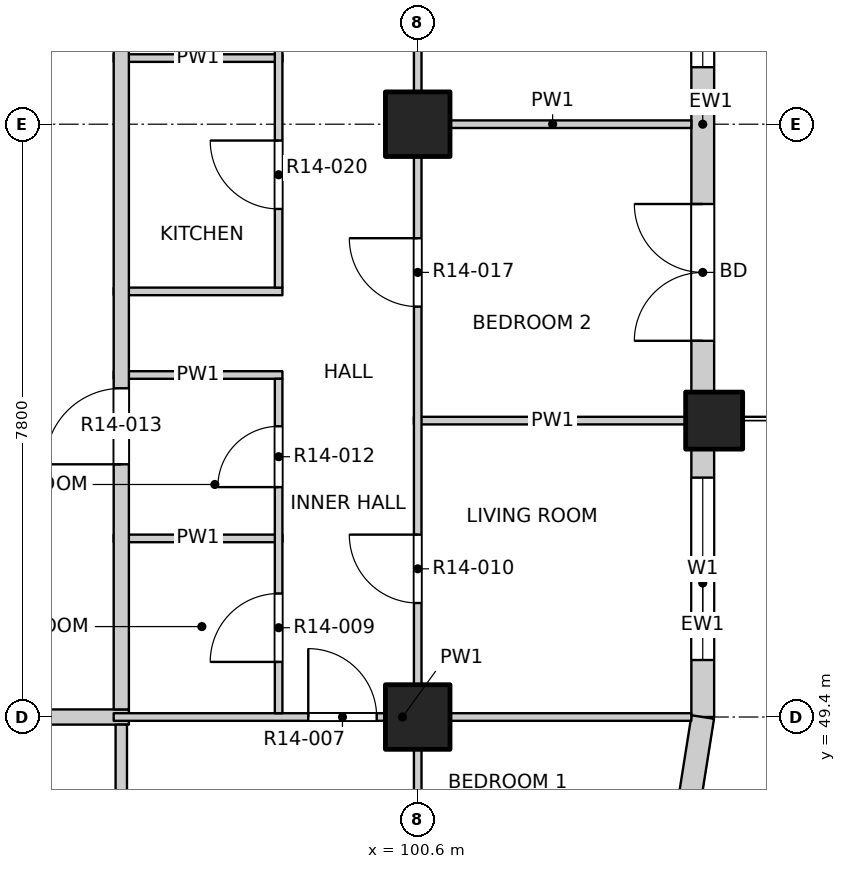
"""IFC4 building model, lengths in metres.
Left out: names, types, materials, properties, quantities, classifications, styles, units other than length and angle.
Written with IfcOpenShell. Run it as: python <this file> out.ifc"""

import sys

from ifc_helpers import new_model, si_unit, direction, frame, frame_2d, origin, origin_2d, place, context, subcontext, project, spatial, rectangle, extrude, element, fill, save


model = new_model("IFC4")
c1 = context("Model", 3, precision=1e-05, world=origin(), true_north=direction((0.0, 1.0)))
c2 = subcontext(c1, "Body", "Model", "MODEL_VIEW")
j1 = project(units=[si_unit("LENGTHUNIT", "METRE"), si_unit("PLANEANGLEUNIT", "RADIAN")], contexts=[c1])
p1 = place(None, origin())
s1 = spatial("IfcSite", under=j1, at=p1, CompositionType="ELEMENT")
p2 = place(p1, origin())
s2 = spatial("IfcBuilding", under=s1, at=p2, CompositionType="ELEMENT")
p3 = place(p2, frame((0.0, 0.0, 148.6)))
s3 = spatial("IfcBuildingStorey", under=s2, at=p3, CompositionType="ELEMENT", Elevation=148.6)
p4 = place(p3, frame((104.5, 53.3, -0.3), z_axis=(0.0, 0.0, 1.0), x_axis=(1.0, 0.0, 0.0)))
e1 = element("IfcColumn", 1, at=p4, inside=s3, PredefinedType="COLUMN", context=c2, shape_type="SweptSolid", body=[
    extrude(rectangle(XDim=0.75, YDim=0.75, at=origin_2d()), origin(), (0.0, 0.0, 1.0), 3.45),
])
for number, where, z_axis, x_axis in (
    (2, (100.6, 49.4, -0.3), (0.0, 0.0, 1.0), (1.0, 0.0, 0.0)),
    (3, (100.6, 57.2, -0.3), (0.0, 0.0, 1.0), (1.0, 0.0, 0.0)),
):
    element("IfcColumn", number, at=place(p3, frame(where, z_axis=z_axis, x_axis=x_axis)), inside=s3, PredefinedType="COLUMN", context=c2, shape_type="SweptSolid", body=[
        extrude(rectangle(XDim=0.85, YDim=0.85, at=origin_2d()), origin(), (0.0, 0.0, 1.0), 3.45),
    ])
p5 = place(p3, frame((104.35, 49.4, 0.0), z_axis=(0.0, 0.0, 1.0), x_axis=(0.0, 1.0, 0.0)))
e4 = element("IfcWall", 4, at=p5, inside=s3, PredefinedType="SOLIDWALL", context=c2, shape_type="SweptSolid", body=[
    extrude(rectangle(XDim=3.525, YDim=0.3, at=frame_2d((1.763, 0.0))), origin(), (0.0, 0.0, 1.0), 2.7),
])
p6 = place(p5, frame((0.75, 0.0, 0.9)))
e5 = element("IfcOpeningElement", 5, at=p6, cuts=e4, PredefinedType="OPENING", context=c2, shape_type="SweptSolid", body=[
    extrude(rectangle(XDim=2.4, YDim=1.8, at=frame_2d((1.2, 0.9))), frame((0.0, 0.16, 0.0), z_axis=(0.0, -1.0, 0.0), x_axis=(1.0, 0.0, 0.0)), (0.0, 0.0, 1.0), 0.32),
])
p7 = place(p3, frame((104.35, 53.675, 0.0), z_axis=(0.0, 0.0, 1.0), x_axis=(0.0, 1.0, 0.0)))
e6 = element("IfcWall", 6, at=p7, inside=s3, PredefinedType="SOLIDWALL", context=c2, shape_type="SweptSolid", body=[
    extrude(rectangle(XDim=7.05, YDim=0.3, at=frame_2d((3.525, 0.0))), origin(), (0.0, 0.0, 1.0), 2.7),
])
p8 = place(p7, frame((0.675, 0.0, 0.0)))
e7 = element("IfcOpeningElement", 7, at=p8, cuts=e6, PredefinedType="OPENING", context=c2, shape_type="SweptSolid", body=[
    extrude(rectangle(XDim=1.8, YDim=2.4, at=frame_2d((0.9, 1.2))), frame((0.0, 0.16, 0.0), z_axis=(0.0, -1.0, 0.0), x_axis=(1.0, 0.0, 0.0)), (0.0, 0.0, 1.0), 0.32),
])
p9 = place(p7, frame((4.275, 0.0, 0.9)))
e8 = element("IfcOpeningElement", 8, at=p9, cuts=e6, PredefinedType="OPENING", context=c2, shape_type="SweptSolid", body=[
    extrude(rectangle(XDim=2.4, YDim=1.8, at=frame_2d((1.2, 0.9))), frame((0.0, 0.16, 0.0), z_axis=(0.0, -1.0, 0.0), x_axis=(1.0, 0.0, 0.0)), (0.0, 0.0, 1.0), 0.32),
])
p10 = place(p3, frame((104.167, 48.241, 0.0), z_axis=(0.0, 0.0, 1.0), x_axis=(0.156496880861, 0.987678452879, 0.0)))
e9 = element("IfcWall", 9, at=p10, inside=s3, PredefinedType="SOLIDWALL", context=c2, shape_type="SweptSolid", body=[
    extrude(rectangle(XDim=1.173, YDim=0.3, at=frame_2d((0.586, 0.0))), origin(), (0.0, 0.0, 1.0), 2.7),
])
p11 = place(p3, frame((73.2, 49.4, 0.0), z_axis=(0.0, 0.0, 1.0), x_axis=(1.0, 0.0, 0.0)))
e10 = element("IfcWall", 10, at=p11, inside=s3, PredefinedType="PARTITIONING", context=c2, shape_type="SweptSolid", body=[
    extrude(rectangle(XDim=23.6, YDim=0.2, at=frame_2d((11.8, 0.0))), origin(), (0.0, 0.0, 1.0), 3.15),
])
p12 = place(p11, frame((4.525, 0.0, 0.0)))
e11 = element("IfcOpeningElement", 11, at=p12, cuts=e10, PredefinedType="OPENING", context=c2, shape_type="SweptSolid", body=[
    extrude(rectangle(XDim=1.2, YDim=2.1, at=frame_2d((0.6, 1.05))), frame((0.0, 0.11, 0.0), z_axis=(0.0, -1.0, 0.0), x_axis=(1.0, 0.0, 0.0)), (0.0, 0.0, 1.0), 0.22),
])
p13 = place(p11, frame((12.325, 0.0, 0.0)))
e12 = element("IfcOpeningElement", 12, at=p13, cuts=e10, PredefinedType="OPENING", context=c2, shape_type="SweptSolid", body=[
    extrude(rectangle(XDim=1.2, YDim=2.1, at=frame_2d((0.6, 1.05))), frame((0.0, 0.11, 0.0), z_axis=(0.0, -1.0, 0.0), x_axis=(1.0, 0.0, 0.0)), (0.0, 0.0, 1.0), 0.22),
])
p14 = place(p11, frame((20.125, 0.0, 0.0)))
e13 = element("IfcOpeningElement", 13, at=p14, cuts=e10, PredefinedType="OPENING", context=c2, shape_type="SweptSolid", body=[
    extrude(rectangle(XDim=1.2, YDim=2.1, at=frame_2d((0.6, 1.05))), frame((0.0, 0.11, 0.0), z_axis=(0.0, -1.0, 0.0), x_axis=(1.0, 0.0, 0.0)), (0.0, 0.0, 1.0), 0.22),
])
p15 = place(p3, frame((96.6, 49.4, 0.0), z_axis=(0.0, 0.0, 1.0), x_axis=(1.0, 0.0, 0.0)))
e14 = element("IfcWall", 14, at=p15, inside=s3, PredefinedType="PARTITIONING", context=c2, shape_type="SweptSolid", body=[
    extrude(rectangle(XDim=7.6, YDim=0.1, at=frame_2d((3.8, 0.0))), origin(), (0.0, 0.0, 1.0), 3.15),
])
p16 = place(p15, frame((2.56, 0.0, 0.0)))
e15 = element("IfcOpeningElement", 15, at=p16, cuts=e14, PredefinedType="OPENING", context=c2, shape_type="SweptSolid", body=[
    extrude(rectangle(XDim=0.9, YDim=2.1, at=frame_2d((0.45, 1.05))), frame((0.0, 0.06, 0.0), z_axis=(0.0, -1.0, 0.0), x_axis=(1.0, 0.0, 0.0)), (0.0, 0.0, 1.0), 0.12),
])
p17 = place(p3, frame((96.6, 51.75, 0.0), z_axis=(0.0, 0.0, 1.0), x_axis=(1.0, 0.0, 0.0)))
e16 = element("IfcWall", 16, at=p17, inside=s3, PredefinedType="PARTITIONING", context=c2, shape_type="SweptSolid", body=[
    extrude(rectangle(XDim=2.22, YDim=0.1, at=frame_2d((1.11, 0.0))), origin(), (0.0, 0.0, 1.0), 3.15),
])
p18 = place(p3, frame((100.55, 53.3, 0.0), z_axis=(0.0, 0.0, 1.0), x_axis=(1.0, 0.0, 0.0)))
e17 = element("IfcWall", 17, at=p18, inside=s3, PredefinedType="PARTITIONING", context=c2, shape_type="SweptSolid", body=[
    extrude(rectangle(XDim=3.65, YDim=0.1, at=frame_2d((1.825, 0.0))), origin(), (0.0, 0.0, 1.0), 3.15),
])
for number, where, z_axis, x_axis in (
    (18, (96.6, 53.9, 0.0), (0.0, 0.0, 1.0), (1.0, 0.0, 0.0)),
    (19, (96.6, 55.0, 0.0), (0.0, 0.0, 1.0), (1.0, 0.0, 0.0)),
):
    element("IfcWall", number, at=place(p3, frame(where, z_axis=z_axis, x_axis=x_axis)), inside=s3, PredefinedType="PARTITIONING", context=c2, shape_type="SweptSolid", body=[
        extrude(rectangle(XDim=2.22, YDim=0.1, at=frame_2d((1.11, 0.0))), origin(), (0.0, 0.0, 1.0), 3.15),
    ])
p19 = place(p3, frame((100.55, 57.2, 0.0), z_axis=(0.0, 0.0, 1.0), x_axis=(1.0, 0.0, 0.0)))
e20 = element("IfcWall", 20, at=p19, inside=s3, PredefinedType="PARTITIONING", context=c2, shape_type="SweptSolid", body=[
    extrude(rectangle(XDim=3.65, YDim=0.1, at=frame_2d((1.825, 0.0))), origin(), (0.0, 0.0, 1.0), 3.15),
])
p20 = place(p3, frame((96.6, 58.07, 0.0), z_axis=(0.0, 0.0, 1.0), x_axis=(1.0, 0.0, 0.0)))
e21 = element("IfcWall", 21, at=p20, inside=s3, PredefinedType="PARTITIONING", context=c2, shape_type="SweptSolid", body=[
    extrude(rectangle(XDim=2.22, YDim=0.1, at=frame_2d((1.11, 0.0))), origin(), (0.0, 0.0, 1.0), 3.15),
])
p21 = place(p3, frame((96.7, 45.8, 0.0), z_axis=(0.0, 0.0, 1.0), x_axis=(0.0, 1.0, 0.0)))
e22 = element("IfcWall", 22, at=p21, inside=s3, PredefinedType="PARTITIONING", context=c2, shape_type="SweptSolid", body=[
    extrude(rectangle(XDim=3.5, YDim=0.15, at=frame_2d((1.75, 0.0))), origin(), (0.0, 0.0, 1.0), 3.15),
])
p22 = place(p3, frame((96.7, 49.5, 0.0), z_axis=(0.0, 0.0, 1.0), x_axis=(0.0, 1.0, 0.0)))
e23 = element("IfcWall", 23, at=p22, inside=s3, PredefinedType="PARTITIONING", context=c2, shape_type="SweptSolid", body=[
    extrude(rectangle(XDim=34.7, YDim=0.2, at=frame_2d((17.35, 0.0))), origin(), (0.0, 0.0, 1.0), 3.15),
])
p23 = place(p22, frame((3.225, 0.0, 0.0)))
e24 = element("IfcOpeningElement", 24, at=p23, cuts=e23, PredefinedType="OPENING", context=c2, shape_type="SweptSolid", body=[
    extrude(rectangle(XDim=1.0, YDim=2.1, at=frame_2d((0.5, 1.05))), frame((0.0, 0.11, 0.0), z_axis=(0.0, -1.0, 0.0), x_axis=(1.0, 0.0, 0.0)), (0.0, 0.0, 1.0), 0.22),
])
p24 = place(p22, frame((19.775, 0.0, 0.0)))
e25 = element("IfcOpeningElement", 25, at=p24, cuts=e23, PredefinedType="OPENING", context=c2, shape_type="SweptSolid", body=[
    extrude(rectangle(XDim=1.0, YDim=2.1, at=frame_2d((0.5, 1.05))), frame((0.0, 0.11, 0.0), z_axis=(0.0, -1.0, 0.0), x_axis=(1.0, 0.0, 0.0)), (0.0, 0.0, 1.0), 0.22),
])
p25 = place(p22, frame((24.125, 0.0, 0.0)))
e26 = element("IfcOpeningElement", 26, at=p25, cuts=e23, PredefinedType="OPENING", context=c2, shape_type="SweptSolid", body=[
    extrude(rectangle(XDim=1.0, YDim=2.1, at=frame_2d((0.5, 1.05))), frame((0.0, 0.11, 0.0), z_axis=(0.0, -1.0, 0.0), x_axis=(1.0, 0.0, 0.0)), (0.0, 0.0, 1.0), 0.22),
])
p26 = place(p3, frame((98.77, 49.45, 0.0), z_axis=(0.0, 0.0, 1.0), x_axis=(0.0, 1.0, 0.0)))
e27 = element("IfcWall", 27, at=p26, inside=s3, PredefinedType="PARTITIONING", context=c2, shape_type="SweptSolid", body=[
    extrude(rectangle(XDim=4.4, YDim=0.1, at=frame_2d((2.2, 0.0))), origin(), (0.0, 0.0, 1.0), 3.15),
])
p27 = place(p26, frame((0.675, 0.0, 0.0)))
e28 = element("IfcOpeningElement", 28, at=p27, cuts=e27, PredefinedType="OPENING", context=c2, shape_type="SweptSolid", body=[
    extrude(rectangle(XDim=0.9, YDim=2.1, at=frame_2d((0.45, 1.05))), frame((0.0, 0.06, 0.0), z_axis=(0.0, -1.0, 0.0), x_axis=(1.0, 0.0, 0.0)), (0.0, 0.0, 1.0), 0.12),
])
p28 = place(p26, frame((2.975, 0.0, 0.0)))
e29 = element("IfcOpeningElement", 29, at=p28, cuts=e27, PredefinedType="OPENING", context=c2, shape_type="SweptSolid", body=[
    extrude(rectangle(XDim=0.8, YDim=2.1, at=frame_2d((0.4, 1.05))), frame((0.0, 0.06, 0.0), z_axis=(0.0, -1.0, 0.0), x_axis=(1.0, 0.0, 0.0)), (0.0, 0.0, 1.0), 0.12),
])
p29 = place(p3, frame((98.77, 55.05, 0.0), z_axis=(0.0, 0.0, 1.0), x_axis=(0.0, 1.0, 0.0)))
e30 = element("IfcWall", 30, at=p29, inside=s3, PredefinedType="PARTITIONING", context=c2, shape_type="SweptSolid", body=[
    extrude(rectangle(XDim=15.35, YDim=0.1, at=frame_2d((7.675, 0.0))), origin(), (0.0, 0.0, 1.0), 3.15),
])
p30 = place(p29, frame((1.035, 0.0, 0.0)))
e31 = element("IfcOpeningElement", 31, at=p30, cuts=e30, PredefinedType="OPENING", context=c2, shape_type="SweptSolid", body=[
    extrude(rectangle(XDim=0.9, YDim=2.1, at=frame_2d((0.45, 1.05))), frame((0.0, 0.06, 0.0), z_axis=(0.0, -1.0, 0.0), x_axis=(1.0, 0.0, 0.0)), (0.0, 0.0, 1.0), 0.12),
])
p31 = place(p29, frame((3.47, 0.0, 0.0)))
e32 = element("IfcOpeningElement", 32, at=p31, cuts=e30, PredefinedType="OPENING", context=c2, shape_type="SweptSolid", body=[
    extrude(rectangle(XDim=0.9, YDim=2.1, at=frame_2d((0.45, 1.05))), frame((0.0, 0.06, 0.0), z_axis=(0.0, -1.0, 0.0), x_axis=(1.0, 0.0, 0.0)), (0.0, 0.0, 1.0), 0.12),
])
p32 = place(p29, frame((5.645, 0.0, 0.0)))
e33 = element("IfcOpeningElement", 33, at=p32, cuts=e30, PredefinedType="OPENING", context=c2, shape_type="SweptSolid", body=[
    extrude(rectangle(XDim=0.8, YDim=2.1, at=frame_2d((0.4, 1.05))), frame((0.0, 0.06, 0.0), z_axis=(0.0, -1.0, 0.0), x_axis=(1.0, 0.0, 0.0)), (0.0, 0.0, 1.0), 0.12),
])
p33 = place(p29, frame((8.21, 0.0, 0.0)))
e34 = element("IfcOpeningElement", 34, at=p33, cuts=e30, PredefinedType="OPENING", context=c2, shape_type="SweptSolid", body=[
    extrude(rectangle(XDim=0.8, YDim=2.1, at=frame_2d((0.4, 1.05))), frame((0.0, 0.06, 0.0), z_axis=(0.0, -1.0, 0.0), x_axis=(1.0, 0.0, 0.0)), (0.0, 0.0, 1.0), 0.12),
])
p34 = place(p29, frame((10.815, 0.0, 0.0)))
e35 = element("IfcOpeningElement", 35, at=p34, cuts=e30, PredefinedType="OPENING", context=c2, shape_type="SweptSolid", body=[
    extrude(rectangle(XDim=0.8, YDim=2.1, at=frame_2d((0.4, 1.05))), frame((0.0, 0.06, 0.0), z_axis=(0.0, -1.0, 0.0), x_axis=(1.0, 0.0, 0.0)), (0.0, 0.0, 1.0), 0.12),
])
p35 = place(p29, frame((13.49, 0.0, 0.0)))
e36 = element("IfcOpeningElement", 36, at=p35, cuts=e30, PredefinedType="OPENING", context=c2, shape_type="SweptSolid", body=[
    extrude(rectangle(XDim=0.9, YDim=2.1, at=frame_2d((0.45, 1.05))), frame((0.0, 0.06, 0.0), z_axis=(0.0, -1.0, 0.0), x_axis=(1.0, 0.0, 0.0)), (0.0, 0.0, 1.0), 0.12),
])
p36 = place(p3, frame((100.6, 45.8, 0.0), z_axis=(0.0, 0.0, 1.0), x_axis=(0.0, 1.0, 0.0)))
e37 = element("IfcWall", 37, at=p36, inside=s3, PredefinedType="PARTITIONING", context=c2, shape_type="SweptSolid", body=[
    extrude(rectangle(XDim=38.4, YDim=0.1, at=frame_2d((19.2, 0.0))), origin(), (0.0, 0.0, 1.0), 3.15),
])
p37 = place(p36, frame((1.05, 0.0, 0.0)))
e38 = element("IfcOpeningElement", 38, at=p37, cuts=e37, PredefinedType="OPENING", context=c2, shape_type="SweptSolid", body=[
    extrude(rectangle(XDim=1.2, YDim=2.1, at=frame_2d((0.6, 1.05))), frame((0.0, 0.06, 0.0), z_axis=(0.0, -1.0, 0.0), x_axis=(1.0, 0.0, 0.0)), (0.0, 0.0, 1.0), 0.12),
])
p38 = place(p36, frame((5.1, 0.0, 0.0)))
e39 = element("IfcOpeningElement", 39, at=p38, cuts=e37, PredefinedType="OPENING", context=c2, shape_type="SweptSolid", body=[
    extrude(rectangle(XDim=0.9, YDim=2.1, at=frame_2d((0.45, 1.05))), frame((0.0, 0.06, 0.0), z_axis=(0.0, -1.0, 0.0), x_axis=(1.0, 0.0, 0.0)), (0.0, 0.0, 1.0), 0.12),
])
p39 = place(p36, frame((9.0, 0.0, 0.0)))
e40 = element("IfcOpeningElement", 40, at=p39, cuts=e37, PredefinedType="OPENING", context=c2, shape_type="SweptSolid", body=[
    extrude(rectangle(XDim=0.9, YDim=2.1, at=frame_2d((0.45, 1.05))), frame((0.0, 0.06, 0.0), z_axis=(0.0, -1.0, 0.0), x_axis=(1.0, 0.0, 0.0)), (0.0, 0.0, 1.0), 0.12),
])
p40 = place(p36, frame((12.9, 0.0, 0.0)))
e41 = element("IfcOpeningElement", 41, at=p40, cuts=e37, PredefinedType="OPENING", context=c2, shape_type="SweptSolid", body=[
    extrude(rectangle(XDim=0.9, YDim=2.1, at=frame_2d((0.45, 1.05))), frame((0.0, 0.06, 0.0), z_axis=(0.0, -1.0, 0.0), x_axis=(1.0, 0.0, 0.0)), (0.0, 0.0, 1.0), 0.12),
])
p41 = place(p36, frame((16.8, 0.0, 0.0)))
e42 = element("IfcOpeningElement", 42, at=p41, cuts=e37, PredefinedType="OPENING", context=c2, shape_type="SweptSolid", body=[
    extrude(rectangle(XDim=0.9, YDim=2.1, at=frame_2d((0.45, 1.05))), frame((0.0, 0.06, 0.0), z_axis=(0.0, -1.0, 0.0), x_axis=(1.0, 0.0, 0.0)), (0.0, 0.0, 1.0), 0.12),
])
p42 = place(p36, frame((20.7, 0.0, 0.0)))
e43 = element("IfcOpeningElement", 43, at=p42, cuts=e37, PredefinedType="OPENING", context=c2, shape_type="SweptSolid", body=[
    extrude(rectangle(XDim=0.9, YDim=2.1, at=frame_2d((0.45, 1.05))), frame((0.0, 0.06, 0.0), z_axis=(0.0, -1.0, 0.0), x_axis=(1.0, 0.0, 0.0)), (0.0, 0.0, 1.0), 0.12),
])
p43 = place(p36, frame((24.6, 0.0, 0.0)))
e44 = element("IfcOpeningElement", 44, at=p43, cuts=e37, PredefinedType="OPENING", context=c2, shape_type="SweptSolid", body=[
    extrude(rectangle(XDim=0.9, YDim=2.1, at=frame_2d((0.45, 1.05))), frame((0.0, 0.06, 0.0), z_axis=(0.0, -1.0, 0.0), x_axis=(1.0, 0.0, 0.0)), (0.0, 0.0, 1.0), 0.12),
])
p44 = place(p36, frame((28.5, 0.0, 0.0)))
e45 = element("IfcOpeningElement", 45, at=p44, cuts=e37, PredefinedType="OPENING", context=c2, shape_type="SweptSolid", body=[
    extrude(rectangle(XDim=0.9, YDim=2.1, at=frame_2d((0.45, 1.05))), frame((0.0, 0.06, 0.0), z_axis=(0.0, -1.0, 0.0), x_axis=(1.0, 0.0, 0.0)), (0.0, 0.0, 1.0), 0.12),
])
p45 = place(p36, frame((32.4, 0.0, 0.0)))
e46 = element("IfcOpeningElement", 46, at=p45, cuts=e37, PredefinedType="OPENING", context=c2, shape_type="SweptSolid", body=[
    extrude(rectangle(XDim=0.9, YDim=2.1, at=frame_2d((0.45, 1.05))), frame((0.0, 0.06, 0.0), z_axis=(0.0, -1.0, 0.0), x_axis=(1.0, 0.0, 0.0)), (0.0, 0.0, 1.0), 0.12),
])
p46 = place(p36, frame((36.15, 0.0, 0.0)))
e47 = element("IfcOpeningElement", 47, at=p46, cuts=e37, PredefinedType="OPENING", context=c2, shape_type="SweptSolid", body=[
    extrude(rectangle(XDim=1.2, YDim=2.1, at=frame_2d((0.6, 1.05))), frame((0.0, 0.06, 0.0), z_axis=(0.0, -1.0, 0.0), x_axis=(1.0, 0.0, 0.0)), (0.0, 0.0, 1.0), 0.12),
])
p47 = place(p6, origin())
e48 = element("IfcWindow", 48, at=p47, inside=s3, PartitioningType="DOUBLE_PANEL_VERTICAL", PredefinedType="WINDOW", context=c2, shape_type="SweptSolid", body=[
    extrude(rectangle(XDim=2.4, YDim=1.8, at=frame_2d((1.2, 0.9))), frame((0.0, 0.03, 0.0), z_axis=(0.0, -1.0, 0.0), x_axis=(1.0, 0.0, 0.0)), (0.0, 0.0, 1.0), 0.06),
])
fill(e5, e48)
p48 = place(p8, origin())
e49 = element("IfcDoor", 49, at=p48, inside=s3, OperationType="DOUBLE_DOOR_SINGLE_SWING", PredefinedType="DOOR", context=c2, shape_type="SweptSolid", body=[
    extrude(rectangle(XDim=1.8, YDim=2.4, at=frame_2d((0.9, 1.2))), frame((0.0, 0.025, 0.0), z_axis=(0.0, -1.0, 0.0), x_axis=(1.0, 0.0, 0.0)), (0.0, 0.0, 1.0), 0.05),
])
fill(e7, e49)
p49 = place(p9, origin())
e50 = element("IfcWindow", 50, at=p49, inside=s3, PartitioningType="DOUBLE_PANEL_VERTICAL", PredefinedType="WINDOW", context=c2, shape_type="SweptSolid", body=[
    extrude(rectangle(XDim=2.4, YDim=1.8, at=frame_2d((1.2, 0.9))), frame((0.0, 0.03, 0.0), z_axis=(0.0, -1.0, 0.0), x_axis=(1.0, 0.0, 0.0)), (0.0, 0.0, 1.0), 0.06),
])
fill(e8, e50)
p50 = place(p16, origin())
e51 = element("IfcDoor", 51, at=p50, inside=s3, OperationType="SINGLE_SWING_LEFT", PredefinedType="DOOR", context=c2, shape_type="SweptSolid", body=[
    extrude(rectangle(XDim=0.9, YDim=2.1, at=frame_2d((0.45, 1.05))), frame((0.0, 0.025, 0.0), z_axis=(0.0, -1.0, 0.0), x_axis=(1.0, 0.0, 0.0)), (0.0, 0.0, 1.0), 0.05),
])
fill(e15, e51)
p51 = place(p27, origin())
e52 = element("IfcDoor", 52, at=p51, inside=s3, OperationType="SINGLE_SWING_LEFT", PredefinedType="DOOR", context=c2, shape_type="SweptSolid", body=[
    extrude(rectangle(XDim=0.9, YDim=2.1, at=frame_2d((0.45, 1.05))), frame((0.0, 0.025, 0.0), z_axis=(0.0, -1.0, 0.0), x_axis=(1.0, 0.0, 0.0)), (0.0, 0.0, 1.0), 0.05),
])
fill(e28, e52)
p52 = place(p38, origin())
e53 = element("IfcDoor", 53, at=p52, inside=s3, OperationType="SINGLE_SWING_RIGHT", PredefinedType="DOOR", context=c2, shape_type="SweptSolid", body=[
    extrude(rectangle(XDim=0.9, YDim=2.1, at=frame_2d((0.45, 1.05))), frame((0.0, 0.025, 0.0), z_axis=(0.0, -1.0, 0.0), x_axis=(1.0, 0.0, 0.0)), (0.0, 0.0, 1.0), 0.05),
])
fill(e39, e53)
p53 = place(p28, origin())
e54 = element("IfcDoor", 54, at=p53, inside=s3, OperationType="SINGLE_SWING_LEFT", PredefinedType="DOOR", context=c2, shape_type="SweptSolid", body=[
    extrude(rectangle(XDim=0.8, YDim=2.1, at=frame_2d((0.4, 1.05))), frame((0.0, 0.025, 0.0), z_axis=(0.0, -1.0, 0.0), x_axis=(1.0, 0.0, 0.0)), (0.0, 0.0, 1.0), 0.05),
])
fill(e29, e54)
p54 = place(p23, origin())
e55 = element("IfcDoor", 55, at=p54, inside=s3, OperationType="SINGLE_SWING_RIGHT", PredefinedType="DOOR", context=c2, shape_type="SweptSolid", body=[
    extrude(rectangle(XDim=1.0, YDim=2.1, at=frame_2d((0.5, 1.05))), frame((0.0, 0.025, 0.0), z_axis=(0.0, -1.0, 0.0), x_axis=(1.0, 0.0, 0.0)), (0.0, 0.0, 1.0), 0.05),
])
fill(e24, e55)
p55 = place(p39, origin())
e56 = element("IfcDoor", 56, at=p55, inside=s3, OperationType="SINGLE_SWING_RIGHT", PredefinedType="DOOR", context=c2, shape_type="SweptSolid", body=[
    extrude(rectangle(XDim=0.9, YDim=2.1, at=frame_2d((0.45, 1.05))), frame((0.0, 0.025, 0.0), z_axis=(0.0, -1.0, 0.0), x_axis=(1.0, 0.0, 0.0)), (0.0, 0.0, 1.0), 0.05),
])
fill(e40, e56)
p56 = place(p30, origin())
e57 = element("IfcDoor", 57, at=p56, inside=s3, OperationType="SINGLE_SWING_RIGHT", PredefinedType="DOOR", context=c2, shape_type="SweptSolid", body=[
    extrude(rectangle(XDim=0.9, YDim=2.1, at=frame_2d((0.45, 1.05))), frame((0.0, 0.025, 0.0), z_axis=(0.0, -1.0, 0.0), x_axis=(1.0, 0.0, 0.0)), (0.0, 0.0, 1.0), 0.05),
])
fill(e31, e57)
save(model, sys.argv[1])
